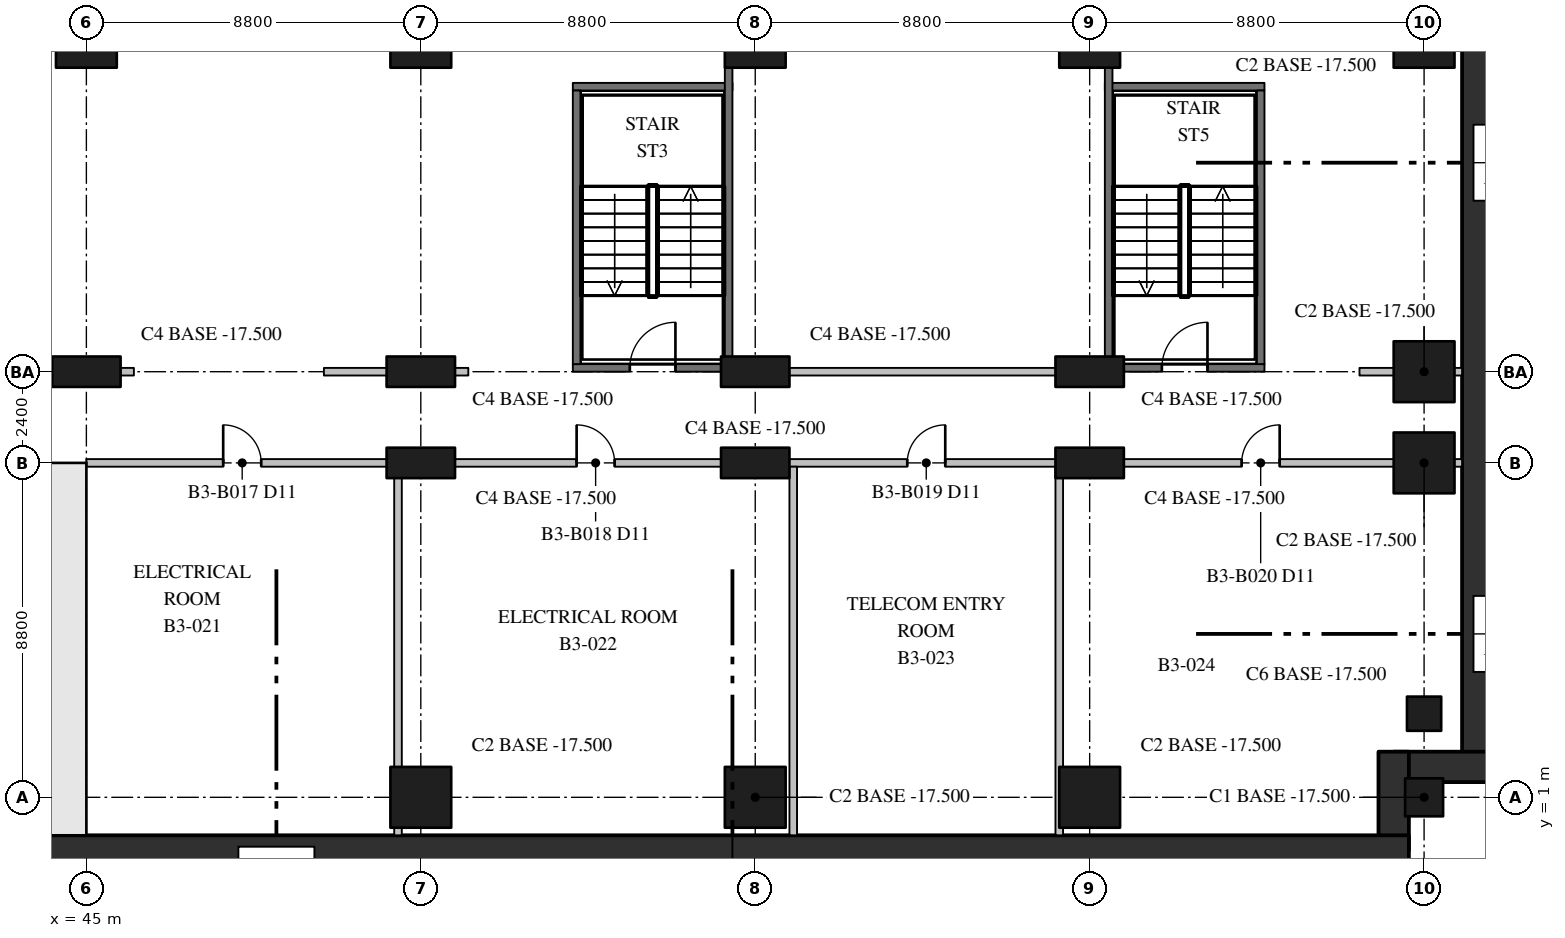
"""IFC4 building model, lengths in metres.
Left out: names, types, materials, properties, quantities, classifications, styles, units other than length and angle.
Written with IfcOpenShell. Run it as: python <this file> out.ifc"""

import sys

from ifc_helpers import new_model, si_unit, direction, frame, frame_2d, origin, origin_2d, place, context, subcontext, project, spatial, rectangle, extrude, element, fill, save


model = new_model("IFC4")
c1 = context("Model", 3, precision=1e-05, world=origin(), true_north=direction((0.0, 1.0)))
c2 = subcontext(c1, "Body", "Model", "MODEL_VIEW")
j1 = project(units=[si_unit("LENGTHUNIT", "METRE"), si_unit("PLANEANGLEUNIT", "RADIAN")], contexts=[c1])
p1 = place(None, origin())
s1 = spatial("IfcSite", under=j1, at=p1, CompositionType="ELEMENT")
p2 = place(p1, origin())
s2 = spatial("IfcBuilding", under=s1, at=p2, CompositionType="ELEMENT")
p3 = place(p2, frame((0.0, 0.0, -17.0)))
s3 = spatial("IfcBuildingStorey", under=s2, at=p3, CompositionType="ELEMENT", Elevation=-17.0)
p4 = place(p3, frame((45.0, 12.2, -0.5), z_axis=(0.0, 0.0, 1.0), x_axis=(1.0, 0.0, 0.0)))
e1 = element("IfcColumn", 1, at=p4, inside=s3, PredefinedType="COLUMN", context=c2, shape_type="SweptSolid", body=[
    extrude(rectangle(XDim=1.8, YDim=0.8, at=origin_2d()), origin(), (0.0, 0.0, 1.0), 5.5),
])
for number, where, z_axis, x_axis in (
    (2, (45.0, 21.0, -0.5), (0.0, 0.0, 1.0), (1.0, 0.0, 0.0)),
    (3, (53.8, 1.0, -0.5), (0.0, 0.0, 1.0), (1.0, 0.0, 0.0)),
):
    element("IfcColumn", number, at=place(p3, frame(where, z_axis=z_axis, x_axis=x_axis)), inside=s3, PredefinedType="COLUMN", context=c2, shape_type="SweptSolid", body=[
        extrude(rectangle(XDim=1.6, YDim=1.6, at=origin_2d()), origin(), (0.0, 0.0, 1.0), 5.5),
    ])
for number, where, z_axis, x_axis in (
    (4, (53.8, 9.8, -0.5), (0.0, 0.0, 1.0), (1.0, 0.0, 0.0)),
    (5, (53.8, 12.2, -0.5), (0.0, 0.0, 1.0), (1.0, 0.0, 0.0)),
):
    element("IfcColumn", number, at=place(p3, frame(where, z_axis=z_axis, x_axis=x_axis)), inside=s3, PredefinedType="COLUMN", context=c2, shape_type="SweptSolid", body=[
        extrude(rectangle(XDim=1.8, YDim=0.8, at=origin_2d()), origin(), (0.0, 0.0, 1.0), 5.5),
    ])
for number, where, z_axis, x_axis in (
    (6, (53.8, 21.0, -0.5), (0.0, 0.0, 1.0), (1.0, 0.0, 0.0)),
    (7, (62.6, 1.0, -0.5), (0.0, 0.0, 1.0), (1.0, 0.0, 0.0)),
):
    element("IfcColumn", number, at=place(p3, frame(where, z_axis=z_axis, x_axis=x_axis)), inside=s3, PredefinedType="COLUMN", context=c2, shape_type="SweptSolid", body=[
        extrude(rectangle(XDim=1.6, YDim=1.6, at=origin_2d()), origin(), (0.0, 0.0, 1.0), 5.5),
    ])
for number, where, z_axis, x_axis in (
    (8, (62.6, 9.8, -0.5), (0.0, 0.0, 1.0), (1.0, 0.0, 0.0)),
    (9, (62.6, 12.2, -0.5), (0.0, 0.0, 1.0), (1.0, 0.0, 0.0)),
):
    element("IfcColumn", number, at=place(p3, frame(where, z_axis=z_axis, x_axis=x_axis)), inside=s3, PredefinedType="COLUMN", context=c2, shape_type="SweptSolid", body=[
        extrude(rectangle(XDim=1.8, YDim=0.8, at=origin_2d()), origin(), (0.0, 0.0, 1.0), 5.5),
    ])
for number, where, z_axis, x_axis in (
    (10, (62.6, 21.0, -0.5), (0.0, 0.0, 1.0), (1.0, 0.0, 0.0)),
    (11, (71.4, 1.0, -0.5), (0.0, 0.0, 1.0), (1.0, 0.0, 0.0)),
):
    element("IfcColumn", number, at=place(p3, frame(where, z_axis=z_axis, x_axis=x_axis)), inside=s3, PredefinedType="COLUMN", context=c2, shape_type="SweptSolid", body=[
        extrude(rectangle(XDim=1.6, YDim=1.6, at=origin_2d()), origin(), (0.0, 0.0, 1.0), 5.5),
    ])
for number, where, z_axis, x_axis in (
    (12, (71.4, 9.8, -0.5), (0.0, 0.0, 1.0), (1.0, 0.0, 0.0)),
    (13, (71.4, 12.2, -0.5), (0.0, 0.0, 1.0), (1.0, 0.0, 0.0)),
):
    element("IfcColumn", number, at=place(p3, frame(where, z_axis=z_axis, x_axis=x_axis)), inside=s3, PredefinedType="COLUMN", context=c2, shape_type="SweptSolid", body=[
        extrude(rectangle(XDim=1.8, YDim=0.8, at=origin_2d()), origin(), (0.0, 0.0, 1.0), 5.5),
    ])
p5 = place(p3, frame((71.4, 21.0, -0.5), z_axis=(0.0, 0.0, 1.0), x_axis=(1.0, 0.0, 0.0)))
e14 = element("IfcColumn", 14, at=p5, inside=s3, PredefinedType="COLUMN", context=c2, shape_type="SweptSolid", body=[
    extrude(rectangle(XDim=1.6, YDim=1.6, at=origin_2d()), origin(), (0.0, 0.0, 1.0), 5.5),
])
p6 = place(p3, frame((80.2, 1.0, -0.5), z_axis=(0.0, 0.0, 1.0), x_axis=(1.0, 0.0, 0.0)))
e15 = element("IfcColumn", 15, at=p6, inside=s3, PredefinedType="COLUMN", context=c2, shape_type="SweptSolid", body=[
    extrude(rectangle(XDim=1.0, YDim=1.0, at=origin_2d()), origin(), (0.0, 0.0, 1.0), 5.5),
])
for number, where, z_axis, x_axis in (
    (16, (80.2, 9.8, -0.5), (0.0, 0.0, 1.0), (1.0, 0.0, 0.0)),
    (17, (80.2, 12.2, -0.5), (0.0, 0.0, 1.0), (1.0, 0.0, 0.0)),
    (18, (80.2, 21.0, -0.5), (0.0, 0.0, 1.0), (1.0, 0.0, 0.0)),
):
    element("IfcColumn", number, at=place(p3, frame(where, z_axis=z_axis, x_axis=x_axis)), inside=s3, PredefinedType="COLUMN", context=c2, shape_type="SweptSolid", body=[
        extrude(rectangle(XDim=1.6, YDim=1.6, at=origin_2d()), origin(), (0.0, 0.0, 1.0), 5.5),
    ])
p7 = place(p3, frame((80.2, 3.2, -0.5), z_axis=(0.0, 0.0, 1.0), x_axis=(1.0, 0.0, 0.0)))
e19 = element("IfcColumn", 19, at=p7, inside=s3, PredefinedType="COLUMN", context=c2, shape_type="SweptSolid", body=[
    extrude(rectangle(XDim=0.9, YDim=0.9, at=origin_2d()), origin(), (0.0, 0.0, 1.0), 5.5),
])
p8 = place(p3, frame((9.8, 0.6, -0.5), z_axis=(0.0, 0.0, 1.0), x_axis=(1.0, 0.0, 0.0)))
e20 = element("IfcWall", 20, at=p8, inside=s3, PredefinedType="SHEAR", context=c2, shape_type="SweptSolid", body=[
    extrude(rectangle(XDim=35.2, YDim=1.2, at=frame_2d((17.6, 0.0))), origin(), (0.0, 0.0, 1.0), 5.5),
])
p9 = place(p3, frame((44.4, 1.2, -0.5), z_axis=(0.0, 0.0, 1.0), x_axis=(0.0, 1.0, 0.0)))
e21 = element("IfcWall", 21, at=p9, inside=s3, PredefinedType="SHEAR", context=c2, shape_type="SweptSolid", body=[
    extrude(rectangle(XDim=8.6, YDim=1.2, at=frame_2d((4.3, 0.0))), origin(), (0.0, 0.0, 1.0), 5.5),
])
p10 = place(p3, frame((40.7, 9.6, -0.5), z_axis=(0.0, 0.0, 1.0), x_axis=(1.0, 0.0, 0.0)))
e22 = element("IfcWall", 22, at=p10, inside=s3, PredefinedType="SHEAR", context=c2, shape_type="SweptSolid", body=[
    extrude(rectangle(XDim=4.3, YDim=0.4, at=frame_2d((2.15, 0.0))), origin(), (0.0, 0.0, 1.0), 5.5),
])
p11 = place(p10, frame((1.05, 0.0, 0.5)))
e23 = element("IfcOpeningElement", 23, at=p11, cuts=e22, PredefinedType="OPENING", context=c2, shape_type="SweptSolid", body=[
    extrude(rectangle(XDim=1.2, YDim=2.1, at=frame_2d((0.6, 1.05))), frame((0.0, 0.21, 0.0), z_axis=(0.0, -1.0, 0.0), x_axis=(1.0, 0.0, 0.0)), (0.0, 0.0, 1.0), 0.42),
])
p12 = place(p3, frame((81.6, 79.8, -0.5), z_axis=(0.0, 0.0, 1.0), x_axis=(0.0, -1.0, 0.0)))
e24 = element("IfcWall", 24, at=p12, inside=s3, PredefinedType="SHEAR", context=c2, shape_type="SweptSolid", body=[
    extrude(rectangle(XDim=78.0, YDim=0.8, at=frame_2d((39.0, 0.0))), origin(), (0.0, 0.0, 1.0), 5.5),
])
p13 = place(p3, frame((82.0, 1.8, -0.5), z_axis=(0.0, 0.0, 1.0), x_axis=(-1.0, 0.0, 0.0)))
e25 = element("IfcWall", 25, at=p13, inside=s3, PredefinedType="SHEAR", context=c2, shape_type="SweptSolid", body=[
    extrude(rectangle(XDim=2.6, YDim=0.8, at=frame_2d((1.3, 0.0))), origin(), (0.0, 0.0, 1.0), 5.5),
])
p14 = place(p3, frame((79.4, 2.2, -0.5), z_axis=(0.0, 0.0, 1.0), x_axis=(0.0, -1.0, 0.0)))
e26 = element("IfcWall", 26, at=p14, inside=s3, PredefinedType="SHEAR", context=c2, shape_type="SweptSolid", body=[
    extrude(rectangle(XDim=2.6, YDim=0.8, at=frame_2d((1.3, 0.0))), origin(), (0.0, 0.0, 1.0), 5.5),
])
p15 = place(p3, frame((79.8, -0.4, -0.5), z_axis=(0.0, 0.0, 1.0), x_axis=(-1.0, 0.0, 0.0)))
e27 = element("IfcWall", 27, at=p15, inside=s3, PredefinedType="SHEAR", context=c2, shape_type="SweptSolid", body=[
    extrude(rectangle(XDim=78.0, YDim=0.8, at=frame_2d((39.0, 0.0))), origin(), (0.0, 0.0, 1.0), 5.5),
])
p16 = place(p3, frame((57.8, 12.3, 0.0), z_axis=(0.0, 0.0, 1.0), x_axis=(1.0, 0.0, 0.0)))
e28 = element("IfcWall", 28, at=p16, inside=s3, PredefinedType="SHEAR", context=c2, shape_type="SweptSolid", body=[
    extrude(rectangle(XDim=4.2, YDim=0.2, at=frame_2d((2.1, 0.0))), origin(), (0.0, 0.0, 1.0), 4.6),
])
p17 = place(p16, frame((1.5, 0.0, 0.0)))
e29 = element("IfcOpeningElement", 29, at=p17, cuts=e28, PredefinedType="OPENING", context=c2, shape_type="SweptSolid", body=[
    extrude(rectangle(XDim=1.2, YDim=2.1, at=frame_2d((0.6, 1.05))), frame((0.0, 0.11, 0.0), z_axis=(0.0, -1.0, 0.0), x_axis=(1.0, 0.0, 0.0)), (0.0, 0.0, 1.0), 0.22),
])
p18 = place(p3, frame((57.8, 19.7, 0.0), z_axis=(0.0, 0.0, 1.0), x_axis=(1.0, 0.0, 0.0)))
e30 = element("IfcWall", 30, at=p18, inside=s3, PredefinedType="SHEAR", context=c2, shape_type="SweptSolid", body=[
    extrude(rectangle(XDim=4.2, YDim=0.2, at=frame_2d((2.1, 0.0))), origin(), (0.0, 0.0, 1.0), 4.6),
])
p19 = place(p3, frame((57.9, 12.4, 0.0), z_axis=(0.0, 0.0, 1.0), x_axis=(0.0, 1.0, 0.0)))
e31 = element("IfcWall", 31, at=p19, inside=s3, PredefinedType="SHEAR", context=c2, shape_type="SweptSolid", body=[
    extrude(rectangle(XDim=7.2, YDim=0.2, at=frame_2d((3.6, 0.0))), origin(), (0.0, 0.0, 1.0), 4.6),
])
p20 = place(p3, frame((61.9, 12.4, 0.0), z_axis=(0.0, 0.0, 1.0), x_axis=(0.0, 1.0, 0.0)))
e32 = element("IfcWall", 32, at=p20, inside=s3, PredefinedType="SHEAR", context=c2, shape_type="SweptSolid", body=[
    extrude(rectangle(XDim=7.8, YDim=0.2, at=frame_2d((3.9, 0.0))), origin(), (0.0, 0.0, 1.0), 4.6),
])
p21 = place(p3, frame((71.8, 12.3, 0.0), z_axis=(0.0, 0.0, 1.0), x_axis=(1.0, 0.0, 0.0)))
e33 = element("IfcWall", 33, at=p21, inside=s3, PredefinedType="SHEAR", context=c2, shape_type="SweptSolid", body=[
    extrude(rectangle(XDim=4.2, YDim=0.2, at=frame_2d((2.1, 0.0))), origin(), (0.0, 0.0, 1.0), 4.6),
])
p22 = place(p21, frame((1.5, 0.0, 0.0)))
e34 = element("IfcOpeningElement", 34, at=p22, cuts=e33, PredefinedType="OPENING", context=c2, shape_type="SweptSolid", body=[
    extrude(rectangle(XDim=1.2, YDim=2.1, at=frame_2d((0.6, 1.05))), frame((0.0, 0.11, 0.0), z_axis=(0.0, -1.0, 0.0), x_axis=(1.0, 0.0, 0.0)), (0.0, 0.0, 1.0), 0.22),
])
p23 = place(p3, frame((71.8, 19.7, 0.0), z_axis=(0.0, 0.0, 1.0), x_axis=(1.0, 0.0, 0.0)))
e35 = element("IfcWall", 35, at=p23, inside=s3, PredefinedType="SHEAR", context=c2, shape_type="SweptSolid", body=[
    extrude(rectangle(XDim=4.2, YDim=0.2, at=frame_2d((2.1, 0.0))), origin(), (0.0, 0.0, 1.0), 4.6),
])
p24 = place(p3, frame((71.9, 12.4, 0.0), z_axis=(0.0, 0.0, 1.0), x_axis=(0.0, 1.0, 0.0)))
e36 = element("IfcWall", 36, at=p24, inside=s3, PredefinedType="SHEAR", context=c2, shape_type="SweptSolid", body=[
    extrude(rectangle(XDim=7.8, YDim=0.2, at=frame_2d((3.9, 0.0))), origin(), (0.0, 0.0, 1.0), 4.6),
])
p25 = place(p3, frame((75.9, 12.4, 0.0), z_axis=(0.0, 0.0, 1.0), x_axis=(0.0, 1.0, 0.0)))
e37 = element("IfcWall", 37, at=p25, inside=s3, PredefinedType="SHEAR", context=c2, shape_type="SweptSolid", body=[
    extrude(rectangle(XDim=7.2, YDim=0.2, at=frame_2d((3.6, 0.0))), origin(), (0.0, 0.0, 1.0), 4.6),
])
p26 = place(p3, frame((25.7, 12.2, 0.0), z_axis=(0.0, 0.0, 1.0), x_axis=(1.0, 0.0, 0.0)))
e38 = element("IfcWall", 38, at=p26, inside=s3, PredefinedType="PARTITIONING", context=c2, shape_type="SweptSolid", body=[
    extrude(rectangle(XDim=20.55, YDim=0.2, at=frame_2d((10.275, 0.0))), origin(), (0.0, 0.0, 1.0), 4.6),
])
p27 = place(p26, frame((4.312, 0.0, 0.0)))
e39 = element("IfcOpeningElement", 39, at=p27, cuts=e38, PredefinedType="OPENING", context=c2, shape_type="SweptSolid", body=[
    extrude(rectangle(XDim=1.8, YDim=2.1, at=frame_2d((0.9, 1.05))), frame((0.0, 0.11, 0.0), z_axis=(0.0, -1.0, 0.0), x_axis=(1.0, 0.0, 0.0)), (0.0, 0.0, 1.0), 0.22),
])
p28 = place(p26, frame((15.56, 0.0, 0.0)))
e40 = element("IfcOpeningElement", 40, at=p28, cuts=e38, PredefinedType="OPENING", context=c2, shape_type="SweptSolid", body=[
    extrude(rectangle(XDim=1.8, YDim=2.1, at=frame_2d((0.9, 1.05))), frame((0.0, 0.11, 0.0), z_axis=(0.0, -1.0, 0.0), x_axis=(1.0, 0.0, 0.0)), (0.0, 0.0, 1.0), 0.22),
])
p29 = place(p3, frame((51.25, 12.2, 0.0), z_axis=(0.0, 0.0, 1.0), x_axis=(1.0, 0.0, 0.0)))
e41 = element("IfcWall", 41, at=p29, inside=s3, PredefinedType="PARTITIONING", context=c2, shape_type="SweptSolid", body=[
    extrude(rectangle(XDim=3.8, YDim=0.2, at=frame_2d((1.9, 0.0))), origin(), (0.0, 0.0, 1.0), 4.6),
])
p30 = place(p3, frame((62.0, 12.2, 0.0), z_axis=(0.0, 0.0, 1.0), x_axis=(1.0, 0.0, 0.0)))
e42 = element("IfcWall", 42, at=p30, inside=s3, PredefinedType="PARTITIONING", context=c2, shape_type="SweptSolid", body=[
    extrude(rectangle(XDim=9.8, YDim=0.2, at=frame_2d((4.9, 0.0))), origin(), (0.0, 0.0, 1.0), 4.6),
])
p31 = place(p3, frame((78.5, 12.2, 0.0), z_axis=(0.0, 0.0, 1.0), x_axis=(1.0, 0.0, 0.0)))
e43 = element("IfcWall", 43, at=p31, inside=s3, PredefinedType="PARTITIONING", context=c2, shape_type="SweptSolid", body=[
    extrude(rectangle(XDim=2.7, YDim=0.2, at=frame_2d((1.35, 0.0))), origin(), (0.0, 0.0, 1.0), 4.6),
])
p32 = place(p3, frame((45.0, 9.8, 0.0), z_axis=(0.0, 0.0, 1.0), x_axis=(1.0, 0.0, 0.0)))
e44 = element("IfcWall", 44, at=p32, inside=s3, PredefinedType="PARTITIONING", context=c2, shape_type="SweptSolid", body=[
    extrude(rectangle(XDim=36.2, YDim=0.2, at=frame_2d((18.1, 0.0))), origin(), (0.0, 0.0, 1.0), 4.6),
])
p33 = place(p32, frame((3.6, 0.0, 0.0)))
e45 = element("IfcOpeningElement", 45, at=p33, cuts=e44, PredefinedType="OPENING", context=c2, shape_type="SweptSolid", body=[
    extrude(rectangle(XDim=1.0, YDim=2.1, at=frame_2d((0.5, 1.05))), frame((0.0, 0.11, 0.0), z_axis=(0.0, -1.0, 0.0), x_axis=(1.0, 0.0, 0.0)), (0.0, 0.0, 1.0), 0.22),
])
p34 = place(p32, frame((12.9, 0.0, 0.0)))
e46 = element("IfcOpeningElement", 46, at=p34, cuts=e44, PredefinedType="OPENING", context=c2, shape_type="SweptSolid", body=[
    extrude(rectangle(XDim=1.0, YDim=2.1, at=frame_2d((0.5, 1.05))), frame((0.0, 0.11, 0.0), z_axis=(0.0, -1.0, 0.0), x_axis=(1.0, 0.0, 0.0)), (0.0, 0.0, 1.0), 0.22),
])
p35 = place(p32, frame((21.6, 0.0, 0.0)))
e47 = element("IfcOpeningElement", 47, at=p35, cuts=e44, PredefinedType="OPENING", context=c2, shape_type="SweptSolid", body=[
    extrude(rectangle(XDim=1.0, YDim=2.1, at=frame_2d((0.5, 1.05))), frame((0.0, 0.11, 0.0), z_axis=(0.0, -1.0, 0.0), x_axis=(1.0, 0.0, 0.0)), (0.0, 0.0, 1.0), 0.22),
])
p36 = place(p32, frame((30.4, 0.0, 0.0)))
e48 = element("IfcOpeningElement", 48, at=p36, cuts=e44, PredefinedType="OPENING", context=c2, shape_type="SweptSolid", body=[
    extrude(rectangle(XDim=1.0, YDim=2.1, at=frame_2d((0.5, 1.05))), frame((0.0, 0.11, 0.0), z_axis=(0.0, -1.0, 0.0), x_axis=(1.0, 0.0, 0.0)), (0.0, 0.0, 1.0), 0.22),
])
for number, where, z_axis, x_axis in (
    (49, (53.2, 0.0, 0.0), (0.0, 0.0, 1.0), (0.0, 1.0, 0.0)),
    (50, (63.6, 0.0, 0.0), (0.0, 0.0, 1.0), (0.0, 1.0, 0.0)),
    (51, (70.6, 0.0, 0.0), (0.0, 0.0, 1.0), (0.0, 1.0, 0.0)),
):
    element("IfcWall", number, at=place(p3, frame(where, z_axis=z_axis, x_axis=x_axis)), inside=s3, PredefinedType="PARTITIONING", context=c2, shape_type="SweptSolid", body=[
        extrude(rectangle(XDim=9.7, YDim=0.2, at=frame_2d((4.85, 0.0))), origin(), (0.0, 0.0, 1.0), 4.6),
    ])
p37 = place(p17, origin())
e52 = element("IfcDoor", 52, at=p37, inside=s3, OperationType="SINGLE_SWING_RIGHT", PredefinedType="DOOR", context=c2, shape_type="SweptSolid", body=[
    extrude(rectangle(XDim=1.2, YDim=2.1, at=frame_2d((0.6, 1.05))), frame((0.0, 0.025, 0.0), z_axis=(0.0, -1.0, 0.0), x_axis=(1.0, 0.0, 0.0)), (0.0, 0.0, 1.0), 0.05),
])
fill(e29, e52)
p38 = place(p22, origin())
e53 = element("IfcDoor", 53, at=p38, inside=s3, OperationType="SINGLE_SWING_RIGHT", PredefinedType="DOOR", context=c2, shape_type="SweptSolid", body=[
    extrude(rectangle(XDim=1.2, YDim=2.1, at=frame_2d((0.6, 1.05))), frame((0.0, 0.025, 0.0), z_axis=(0.0, -1.0, 0.0), x_axis=(1.0, 0.0, 0.0)), (0.0, 0.0, 1.0), 0.05),
])
fill(e34, e53)
p39 = place(p33, origin())
e54 = element("IfcDoor", 54, at=p39, inside=s3, OperationType="SINGLE_SWING_LEFT", PredefinedType="DOOR", context=c2, shape_type="SweptSolid", body=[
    extrude(rectangle(XDim=1.0, YDim=2.1, at=frame_2d((0.5, 1.05))), frame((0.0, 0.025, 0.0), z_axis=(0.0, -1.0, 0.0), x_axis=(1.0, 0.0, 0.0)), (0.0, 0.0, 1.0), 0.05),
])
fill(e45, e54)
p40 = place(p34, origin())
e55 = element("IfcDoor", 55, at=p40, inside=s3, OperationType="SINGLE_SWING_LEFT", PredefinedType="DOOR", context=c2, shape_type="SweptSolid", body=[
    extrude(rectangle(XDim=1.0, YDim=2.1, at=frame_2d((0.5, 1.05))), frame((0.0, 0.025, 0.0), z_axis=(0.0, -1.0, 0.0), x_axis=(1.0, 0.0, 0.0)), (0.0, 0.0, 1.0), 0.05),
])
fill(e46, e55)
p41 = place(p35, origin())
e56 = element("IfcDoor", 56, at=p41, inside=s3, OperationType="SINGLE_SWING_RIGHT", PredefinedType="DOOR", context=c2, shape_type="SweptSolid", body=[
    extrude(rectangle(XDim=1.0, YDim=2.1, at=frame_2d((0.5, 1.05))), frame((0.0, 0.025, 0.0), z_axis=(0.0, -1.0, 0.0), x_axis=(1.0, 0.0, 0.0)), (0.0, 0.0, 1.0), 0.05),
])
fill(e47, e56)
p42 = place(p36, origin())
e57 = element("IfcDoor", 57, at=p42, inside=s3, OperationType="SINGLE_SWING_RIGHT", PredefinedType="DOOR", context=c2, shape_type="SweptSolid", body=[
    extrude(rectangle(XDim=1.0, YDim=2.1, at=frame_2d((0.5, 1.05))), frame((0.0, 0.025, 0.0), z_axis=(0.0, -1.0, 0.0), x_axis=(1.0, 0.0, 0.0)), (0.0, 0.0, 1.0), 0.05),
])
fill(e48, e57)
save(model, sys.argv[1])
